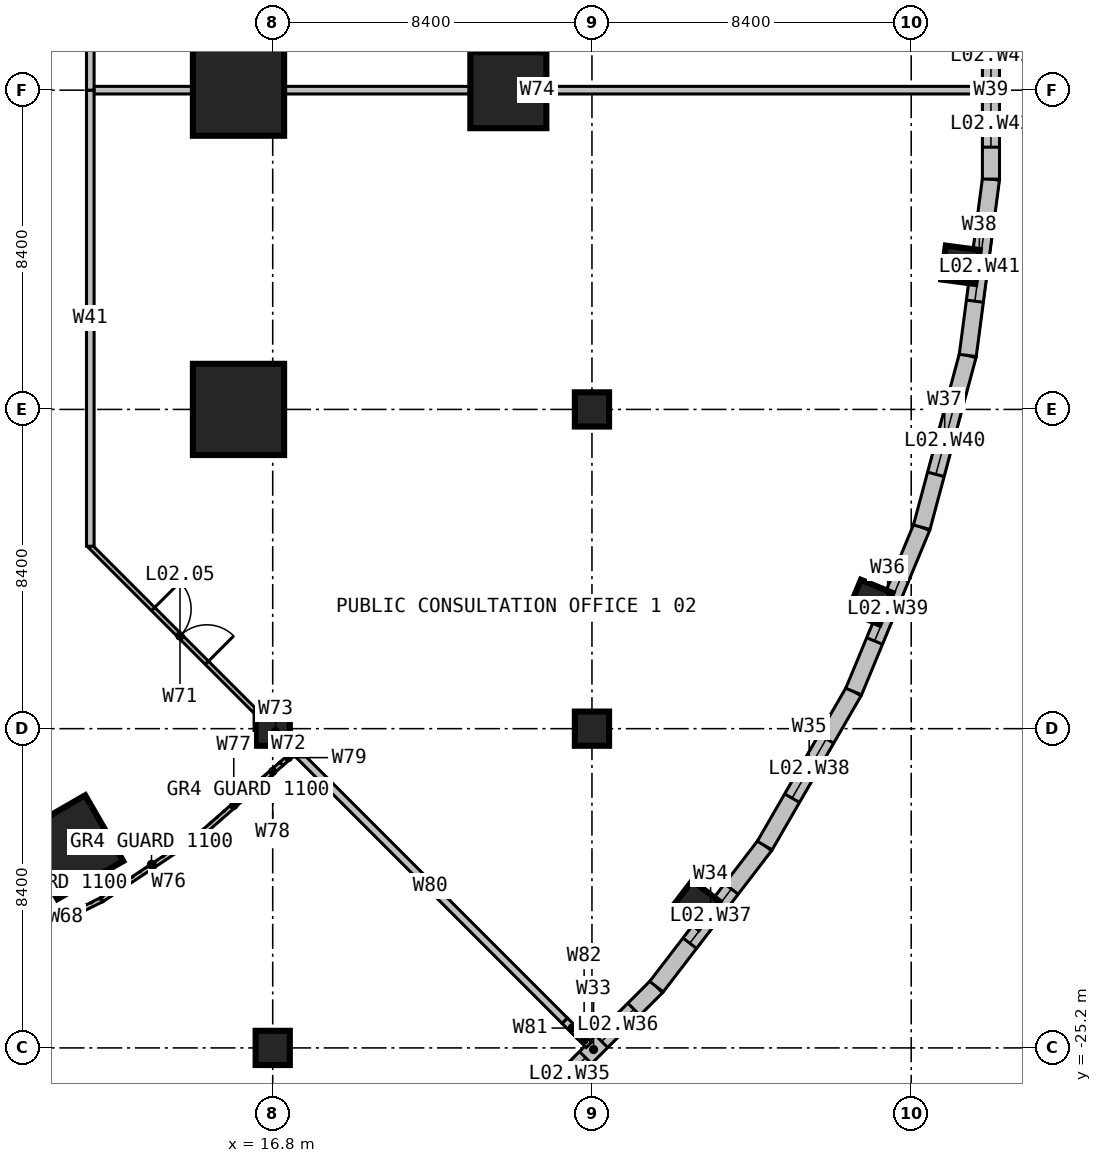
"""IFC4 building model, lengths in metres.
Left out: names, types, materials, properties, quantities, classifications, styles, units other than length and angle.
Written with IfcOpenShell. Run it as: python <this file> out.ifc"""

import sys

from ifc_helpers import new_model, si_unit, direction, frame, frame_2d, origin, origin_2d, place, context, subcontext, project, spatial, rectangle, hollow_rectangle, extrude, element, fill, save


model = new_model("IFC4")
c1 = context("Model", 3, precision=1e-05, world=origin(), true_north=direction((0.0, 1.0)))
c2 = subcontext(c1, "Body", "Model", "MODEL_VIEW")
j1 = project(units=[si_unit("LENGTHUNIT", "METRE"), si_unit("PLANEANGLEUNIT", "RADIAN")], contexts=[c1])
p1 = place(None, origin())
s1 = spatial("IfcSite", under=j1, at=p1, CompositionType="ELEMENT")
p2 = place(p1, origin())
s2 = spatial("IfcBuilding", under=s1, at=p2, CompositionType="ELEMENT")
p3 = place(p2, frame((0.0, 0.0, 11.0)))
s3 = spatial("IfcBuildingStorey", under=s2, at=p3, CompositionType="ELEMENT", Elevation=11.0)
for number, where, z_axis, x_axis in (
    (1, (16.8, -25.2, 0.0), (0.0, 0.0, 1.0), (1.0, 0.0, 0.0)),
    (2, (16.8, -16.8, 0.0), (0.0, 0.0, 1.0), (1.0, 0.0, 0.0)),
):
    element("IfcColumn", number, at=place(p3, frame(where, z_axis=z_axis, x_axis=x_axis)), inside=s3, PredefinedType="COLUMN", context=c2, shape_type="SweptSolid", body=[
        extrude(rectangle(XDim=0.9, YDim=0.9, at=origin_2d()), origin(), (0.0, 0.0, 1.0), 5.0),
    ])
for number, where, z_axis, x_axis in (
    (3, (15.9, -8.4, 0.0), (0.0, 0.0, 1.0), (1.0, 0.0, 0.0)),
    (4, (15.9, 0.0, 0.0), (0.0, 0.0, 1.0), (1.0, 0.0, 0.0)),
):
    element("IfcColumn", number, at=place(p3, frame(where, z_axis=z_axis, x_axis=x_axis)), inside=s3, PredefinedType="COLUMN", context=c2, shape_type="SweptSolid", body=[
        extrude(rectangle(XDim=2.4, YDim=2.4, at=origin_2d()), origin(), (0.0, 0.0, 1.0), 5.0),
    ])
for number, where, z_axis, x_axis in (
    (5, (25.2, -16.8, 0.0), (0.0, 0.0, 1.0), (1.0, 0.0, 0.0)),
    (6, (25.2, -8.4, 0.0), (0.0, 0.0, 1.0), (1.0, 0.0, 0.0)),
    (7, (27.926, -21.428, 0.0), (0.0, 0.0, 1.0), (0.793, -0.609, 0.0)),
    (8, (32.521, -13.47, 0.0), (0.0, 0.0, 1.0), (0.924, -0.383, 0.0)),
    (9, (34.899, -4.594, 0.0), (0.0, 0.0, 1.0), (0.991, -0.131, 0.0)),
):
    element("IfcColumn", number, at=place(p3, frame(where, z_axis=z_axis, x_axis=x_axis)), inside=s3, PredefinedType="COLUMN", context=c2, shape_type="SweptSolid", body=[
        extrude(rectangle(XDim=0.9, YDim=0.9, at=origin_2d()), origin(), (0.0, 0.0, 1.0), 5.0),
    ])
for number, where, z_axis, x_axis in (
    (10, (23.0, 0.0, 0.0), (0.0, 0.0, 1.0), (1.0, 0.0, 0.0)),
    (11, (11.5, -19.919, 0.0), (0.0, 0.0, 1.0), (0.5, -0.866, 0.0)),
):
    element("IfcColumn", number, at=place(p3, frame(where, z_axis=z_axis, x_axis=x_axis)), inside=s3, PredefinedType="COLUMN", context=c2, shape_type="SweptSolid", body=[
        extrude(hollow_rectangle(XDim=2.0, YDim=2.0, WallThickness=0.24, at=origin_2d()), origin(), (0.0, 0.0, 1.0), 5.0),
    ])
p4 = place(p3, frame((23.588, -26.897, 0.0), z_axis=(0.0, 0.0, 1.0), x_axis=(0.707106781187, 0.707106781187, 0.0)))
e12 = element("IfcWall", 12, at=p4, inside=s3, PredefinedType="SOLIDWALL", context=c2, shape_type="SweptSolid", body=[
    extrude(rectangle(XDim=4.679, YDim=0.45, at=frame_2d((2.34, 0.0))), origin(), (0.0, 0.0, 1.0), 4.7),
])
p5 = place(p4, frame((0.84, 0.0, 0.9)))
e13 = element("IfcOpeningElement", 13, at=p5, cuts=e12, PredefinedType="OPENING", context=c2, shape_type="SweptSolid", body=[
    extrude(rectangle(XDim=1.2, YDim=2.4, at=frame_2d((0.6, 1.2))), frame((0.0, 0.235, 0.0), z_axis=(0.0, -1.0, 0.0), x_axis=(1.0, 0.0, 0.0)), (0.0, 0.0, 1.0), 0.47),
])
p6 = place(p4, frame((2.64, 0.0, 0.9)))
e14 = element("IfcOpeningElement", 14, at=p6, cuts=e12, PredefinedType="OPENING", context=c2, shape_type="SweptSolid", body=[
    extrude(rectangle(XDim=1.2, YDim=2.4, at=frame_2d((0.6, 1.2))), frame((0.0, 0.235, 0.0), z_axis=(0.0, -1.0, 0.0), x_axis=(1.0, 0.0, 0.0)), (0.0, 0.0, 1.0), 0.47),
])
p7 = place(p3, frame((26.897, -23.588, 0.0), z_axis=(0.0, 0.0, 1.0), x_axis=(0.608769916927, 0.79334682721, 0.0)))
e15 = element("IfcWall", 15, at=p7, inside=s3, PredefinedType="SOLIDWALL", context=c2, shape_type="SweptSolid", body=[
    extrude(rectangle(XDim=4.68, YDim=0.45, at=frame_2d((2.34, 0.0))), origin(), (0.0, 0.0, 1.0), 4.7),
])
p8 = place(p7, frame((1.44, 0.0, 0.9)))
e16 = element("IfcOpeningElement", 16, at=p8, cuts=e15, PredefinedType="OPENING", context=c2, shape_type="SweptSolid", body=[
    extrude(rectangle(XDim=1.8, YDim=2.4, at=frame_2d((0.9, 1.2))), frame((0.0, 0.235, 0.0), z_axis=(0.0, -1.0, 0.0), x_axis=(1.0, 0.0, 0.0)), (0.0, 0.0, 1.0), 0.47),
])
p9 = place(p3, frame((29.746, -19.875, 0.0), z_axis=(0.0, 0.0, 1.0), x_axis=(0.500022025083, 0.866012687223, 0.0)))
e17 = element("IfcWall", 17, at=p9, inside=s3, PredefinedType="SOLIDWALL", context=c2, shape_type="SweptSolid", body=[
    extrude(rectangle(XDim=4.679, YDim=0.45, at=frame_2d((2.34, 0.0))), origin(), (0.0, 0.0, 1.0), 4.7),
])
p10 = place(p9, frame((1.44, 0.0, 0.9)))
e18 = element("IfcOpeningElement", 18, at=p10, cuts=e17, PredefinedType="OPENING", context=c2, shape_type="SweptSolid", body=[
    extrude(rectangle(XDim=1.8, YDim=2.4, at=frame_2d((0.9, 1.2))), frame((0.0, 0.235, 0.0), z_axis=(0.0, -1.0, 0.0), x_axis=(1.0, 0.0, 0.0)), (0.0, 0.0, 1.0), 0.47),
])
p11 = place(p3, frame((32.086, -15.823, 0.0), z_axis=(0.0, 0.0, 1.0), x_axis=(0.382669718086, 0.923885213032, 0.0)))
e19 = element("IfcWall", 19, at=p11, inside=s3, PredefinedType="SOLIDWALL", context=c2, shape_type="SweptSolid", body=[
    extrude(rectangle(XDim=4.68, YDim=0.45, at=frame_2d((2.34, 0.0))), origin(), (0.0, 0.0, 1.0), 4.7),
])
p12 = place(p11, frame((1.44, 0.0, 0.9)))
e20 = element("IfcOpeningElement", 20, at=p12, cuts=e19, PredefinedType="OPENING", context=c2, shape_type="SweptSolid", body=[
    extrude(rectangle(XDim=1.8, YDim=2.4, at=frame_2d((0.9, 1.2))), frame((0.0, 0.235, 0.0), z_axis=(0.0, -1.0, 0.0), x_axis=(1.0, 0.0, 0.0)), (0.0, 0.0, 1.0), 0.47),
])
p13 = place(p3, frame((33.876, -11.5, 0.0), z_axis=(0.0, 0.0, 1.0), x_axis=(0.258815185258, 0.965926860523, 0.0)))
e21 = element("IfcWall", 21, at=p13, inside=s3, PredefinedType="SOLIDWALL", context=c2, shape_type="SweptSolid", body=[
    extrude(rectangle(XDim=4.68, YDim=0.45, at=frame_2d((2.34, 0.0))), origin(), (0.0, 0.0, 1.0), 4.7),
])
p14 = place(p13, frame((1.44, 0.0, 0.9)))
e22 = element("IfcOpeningElement", 22, at=p14, cuts=e21, PredefinedType="OPENING", context=c2, shape_type="SweptSolid", body=[
    extrude(rectangle(XDim=1.8, YDim=2.4, at=frame_2d((0.9, 1.2))), frame((0.0, 0.235, 0.0), z_axis=(0.0, -1.0, 0.0), x_axis=(1.0, 0.0, 0.0)), (0.0, 0.0, 1.0), 0.47),
])
p15 = place(p3, frame((35.088, -6.979, 0.0), z_axis=(0.0, 0.0, 1.0), x_axis=(0.130536838198, 0.991443459746, 0.0)))
e23 = element("IfcWall", 23, at=p15, inside=s3, PredefinedType="SOLIDWALL", context=c2, shape_type="SweptSolid", body=[
    extrude(rectangle(XDim=4.679, YDim=0.45, at=frame_2d((2.34, 0.0))), origin(), (0.0, 0.0, 1.0), 4.7),
])
p16 = place(p15, frame((1.44, 0.0, 0.9)))
e24 = element("IfcOpeningElement", 24, at=p16, cuts=e23, PredefinedType="OPENING", context=c2, shape_type="SweptSolid", body=[
    extrude(rectangle(XDim=1.8, YDim=2.4, at=frame_2d((0.9, 1.2))), frame((0.0, 0.235, 0.0), z_axis=(0.0, -1.0, 0.0), x_axis=(1.0, 0.0, 0.0)), (0.0, 0.0, 1.0), 0.47),
])
p17 = place(p3, frame((35.698, -2.34, 0.0), z_axis=(0.0, 0.0, 1.0), x_axis=(0.0, 1.0, 0.0)))
e25 = element("IfcWall", 25, at=p17, inside=s3, PredefinedType="SOLIDWALL", context=c2, shape_type="SweptSolid", body=[
    extrude(rectangle(XDim=4.68, YDim=0.45, at=frame_2d((2.34, 0.0))), origin(), (0.0, 0.0, 1.0), 4.7),
])
p18 = place(p17, frame((0.84, 0.0, 0.9)))
e26 = element("IfcOpeningElement", 26, at=p18, cuts=e25, PredefinedType="OPENING", context=c2, shape_type="SweptSolid", body=[
    extrude(rectangle(XDim=1.2, YDim=2.4, at=frame_2d((0.6, 1.2))), frame((0.0, 0.235, 0.0), z_axis=(0.0, -1.0, 0.0), x_axis=(1.0, 0.0, 0.0)), (0.0, 0.0, 1.0), 0.47),
])
p19 = place(p17, frame((2.64, 0.0, 0.9)))
e27 = element("IfcOpeningElement", 27, at=p19, cuts=e25, PredefinedType="OPENING", context=c2, shape_type="SweptSolid", body=[
    extrude(rectangle(XDim=1.2, YDim=2.4, at=frame_2d((0.6, 1.2))), frame((0.0, 0.235, 0.0), z_axis=(0.0, -1.0, 0.0), x_axis=(1.0, 0.0, 0.0)), (0.0, 0.0, 1.0), 0.47),
])
p20 = place(p3, frame((10.408, -22.233, 0.0), z_axis=(0.0, 0.0, 1.0), x_axis=(0.896913641042, 0.442205744551, 0.0)))
e28 = element("IfcWall", 28, at=p20, inside=s3, PredefinedType="PARTITIONING", context=c2, shape_type="SweptSolid", body=[
    extrude(rectangle(XDim=2.109, YDim=0.12, at=frame_2d((1.055, 0.0))), origin(), (0.0, 0.0, 1.0), 4.7),
])
p21 = place(p3, frame((12.0, -12.0, 0.0), z_axis=(0.0, 0.0, 1.0), x_axis=(0.707106781187, -0.707106781187, 0.0)))
e29 = element("IfcWall", 29, at=p21, inside=s3, PredefinedType="PARTITIONING", context=c2, shape_type="SweptSolid", body=[
    extrude(rectangle(XDim=6.675, YDim=0.12, at=frame_2d((3.337, 0.0))), origin(), (0.0, 0.0, 1.0), 4.7),
])
p22 = place(p21, frame((2.338, 0.0, 0.0)))
e30 = element("IfcOpeningElement", 30, at=p22, cuts=e29, PredefinedType="OPENING", context=c2, shape_type="SweptSolid", body=[
    extrude(rectangle(XDim=2.0, YDim=2.4, at=frame_2d((1.0, 1.2))), frame((0.0, 0.07, 0.0), z_axis=(0.0, -1.0, 0.0), x_axis=(1.0, 0.0, 0.0)), (0.0, 0.0, 1.0), 0.14),
])
p23 = place(p3, frame((17.03, -17.03, 0.0), z_axis=(0.0, 0.0, 1.0), x_axis=(0.707106781187, -0.707106781187, 0.0)))
e31 = element("IfcWall", 31, at=p23, inside=s3, PredefinedType="PARTITIONING", context=c2, shape_type="SweptSolid", body=[
    extrude(rectangle(XDim=0.523, YDim=0.12, at=frame_2d((0.262, 0.0))), origin(), (0.0, 0.0, 1.0), 4.7),
])
p24 = place(p3, frame((16.72, -16.72, 0.0), z_axis=(0.0, 0.0, 1.0), x_axis=(0.707106781187, -0.707106781187, 0.0)))
e32 = element("IfcWall", 32, at=p24, inside=s3, PredefinedType="PARTITIONING", context=c2, shape_type="SweptSolid", body=[
    extrude(rectangle(XDim=0.438, YDim=0.12, at=frame_2d((0.219, 0.0))), origin(), (0.0, 0.0, 1.0), 4.3),
])
p25 = place(p3, frame((12.0, 0.0, 0.0), z_axis=(0.0, 0.0, 1.0), x_axis=(1.0, 0.0, 0.0)))
e33 = element("IfcWall", 33, at=p25, inside=s3, PredefinedType="PARTITIONING", context=c2, shape_type="SweptSolid", body=[
    extrude(rectangle(XDim=23.52, YDim=0.2, at=frame_2d((11.76, 0.0))), origin(), (0.0, 0.0, 1.0), 4.7),
])
p26 = place(p3, frame((12.3, -21.3, 0.0), z_axis=(0.0, 0.0, 1.0), x_axis=(0.832994734858, 0.553280915719, 0.0)))
e34 = element("IfcWall", 34, at=p26, inside=s3, PredefinedType="PARTITIONING", context=c2, shape_type="SweptSolid", body=[
    extrude(rectangle(XDim=3.217, YDim=0.12, at=frame_2d((1.609, 0.0))), origin(), (0.0, 0.0, 1.0), 4.7),
])
p27 = place(p3, frame((14.98, -19.52, 0.0), z_axis=(0.0, 0.0, 1.0), x_axis=(0.752226011438, 0.658905173538, 0.0)))
e35 = element("IfcWall", 35, at=p27, inside=s3, PredefinedType="PARTITIONING", context=c2, shape_type="SweptSolid", body=[
    extrude(rectangle(XDim=2.114, YDim=0.12, at=frame_2d((1.057, 0.0))), origin(), (0.0, 0.0, 1.0), 4.7),
])
p28 = place(p3, frame((16.57, -18.127, 0.0), z_axis=(0.0, 0.0, 1.0), x_axis=(0.752081905539, 0.65906965289, 0.0)))
e36 = element("IfcWall", 36, at=p28, inside=s3, PredefinedType="PARTITIONING", context=c2, shape_type="SweptSolid", body=[
    extrude(rectangle(XDim=0.612, YDim=0.12, at=frame_2d((0.306, 0.0))), origin(), (0.0, 0.0, 1.0), 4.3),
])
p29 = place(p3, frame((17.03, -17.724, 0.0), z_axis=(0.0, 0.0, 1.0), x_axis=(0.751992181934, 0.659172024824, 0.0)))
e37 = element("IfcWall", 37, at=p29, inside=s3, PredefinedType="PARTITIONING", context=c2, shape_type="SweptSolid", body=[
    extrude(rectangle(XDim=0.492, YDim=0.12, at=frame_2d((0.246, 0.0))), origin(), (0.0, 0.0, 1.0), 4.7),
])
p30 = place(p3, frame((17.4, -17.4, 0.0), z_axis=(0.0, 0.0, 1.0), x_axis=(0.707106781187, -0.707106781187, 0.0)))
e38 = element("IfcWall", 38, at=p30, inside=s3, PredefinedType="PARTITIONING", context=c2, shape_type="SweptSolid", body=[
    extrude(rectangle(XDim=10.022, YDim=0.2, at=frame_2d((5.011, 0.0))), origin(), (0.0, 0.0, 1.0), 4.7),
])
p31 = place(p3, frame((24.486, -24.486, 0.0), z_axis=(0.0, 0.0, 1.0), x_axis=(0.707106781187, -0.707106781187, 0.0)))
e39 = element("IfcWall", 39, at=p31, inside=s3, PredefinedType="PARTITIONING", context=c2, shape_type="SweptSolid", body=[
    extrude(rectangle(XDim=0.54, YDim=0.2, at=frame_2d((0.27, 0.0))), origin(), (0.0, 0.0, 1.0), 4.3),
])
p32 = place(p3, frame((24.868, -24.868, 0.0), z_axis=(0.0, 0.0, 1.0), x_axis=(0.707106781187, -0.707106781187, 0.0)))
e40 = element("IfcWall", 40, at=p32, inside=s3, PredefinedType="PARTITIONING", context=c2, shape_type="SweptSolid", body=[
    extrude(rectangle(XDim=0.356, YDim=0.2, at=frame_2d((0.178, 0.0))), origin(), (0.0, 0.0, 1.0), 4.7),
])
p33 = place(p3, frame((12.0, -12.0, 0.0), z_axis=(0.0, 0.0, 1.0), x_axis=(0.0, 1.0, 0.0)))
e41 = element("IfcWall", 41, at=p33, inside=s3, PredefinedType="PARTITIONING", context=c2, shape_type="SweptSolid", body=[
    extrude(rectangle(XDim=12.0, YDim=0.2, at=frame_2d((6.0, 0.0))), origin(), (0.0, 0.0, 1.0), 4.7),
])
p34 = place(p3, frame((12.0, 0.0, 0.0), z_axis=(0.0, 0.0, 1.0), x_axis=(0.0, 1.0, 0.0)))
e42 = element("IfcWall", 42, at=p34, inside=s3, PredefinedType="PARTITIONING", context=c2, shape_type="SweptSolid", body=[
    extrude(rectangle(XDim=12.0, YDim=0.2, at=frame_2d((6.0, 0.0))), origin(), (0.0, 0.0, 1.0), 4.7),
])
p35 = place(p34, frame((5.0, 0.0, 0.0)))
e43 = element("IfcOpeningElement", 43, at=p35, cuts=e42, PredefinedType="OPENING", context=c2, shape_type="SweptSolid", body=[
    extrude(rectangle(XDim=2.0, YDim=2.4, at=frame_2d((1.0, 1.2))), frame((0.0, 0.11, 0.0), z_axis=(0.0, -1.0, 0.0), x_axis=(1.0, 0.0, 0.0)), (0.0, 0.0, 1.0), 0.22),
])
p36 = place(p5, origin())
e44 = element("IfcWindow", 44, at=p36, inside=s3, PartitioningType="SINGLE_PANEL", PredefinedType="WINDOW", context=c2, shape_type="SweptSolid", body=[
    extrude(rectangle(XDim=1.2, YDim=2.4, at=frame_2d((0.6, 1.2))), frame((0.0, 0.03, 0.0), z_axis=(0.0, -1.0, 0.0), x_axis=(1.0, 0.0, 0.0)), (0.0, 0.0, 1.0), 0.06),
])
fill(e13, e44)
p37 = place(p6, origin())
e45 = element("IfcWindow", 45, at=p37, inside=s3, PartitioningType="SINGLE_PANEL", PredefinedType="WINDOW", context=c2, shape_type="SweptSolid", body=[
    extrude(rectangle(XDim=1.2, YDim=2.4, at=frame_2d((0.6, 1.2))), frame((0.0, 0.03, 0.0), z_axis=(0.0, -1.0, 0.0), x_axis=(1.0, 0.0, 0.0)), (0.0, 0.0, 1.0), 0.06),
])
fill(e14, e45)
p38 = place(p8, origin())
e46 = element("IfcWindow", 46, at=p38, inside=s3, PartitioningType="SINGLE_PANEL", PredefinedType="WINDOW", context=c2, shape_type="SweptSolid", body=[
    extrude(rectangle(XDim=1.8, YDim=2.4, at=frame_2d((0.9, 1.2))), frame((0.0, 0.03, 0.0), z_axis=(0.0, -1.0, 0.0), x_axis=(1.0, 0.0, 0.0)), (0.0, 0.0, 1.0), 0.06),
])
fill(e16, e46)
p39 = place(p10, origin())
e47 = element("IfcWindow", 47, at=p39, inside=s3, PartitioningType="SINGLE_PANEL", PredefinedType="WINDOW", context=c2, shape_type="SweptSolid", body=[
    extrude(rectangle(XDim=1.8, YDim=2.4, at=frame_2d((0.9, 1.2))), frame((0.0, 0.03, 0.0), z_axis=(0.0, -1.0, 0.0), x_axis=(1.0, 0.0, 0.0)), (0.0, 0.0, 1.0), 0.06),
])
fill(e18, e47)
p40 = place(p12, origin())
e48 = element("IfcWindow", 48, at=p40, inside=s3, PartitioningType="SINGLE_PANEL", PredefinedType="WINDOW", context=c2, shape_type="SweptSolid", body=[
    extrude(rectangle(XDim=1.8, YDim=2.4, at=frame_2d((0.9, 1.2))), frame((0.0, 0.03, 0.0), z_axis=(0.0, -1.0, 0.0), x_axis=(1.0, 0.0, 0.0)), (0.0, 0.0, 1.0), 0.06),
])
fill(e20, e48)
p41 = place(p14, origin())
e49 = element("IfcWindow", 49, at=p41, inside=s3, PartitioningType="SINGLE_PANEL", PredefinedType="WINDOW", context=c2, shape_type="SweptSolid", body=[
    extrude(rectangle(XDim=1.8, YDim=2.4, at=frame_2d((0.9, 1.2))), frame((0.0, 0.03, 0.0), z_axis=(0.0, -1.0, 0.0), x_axis=(1.0, 0.0, 0.0)), (0.0, 0.0, 1.0), 0.06),
])
fill(e22, e49)
p42 = place(p16, origin())
e50 = element("IfcWindow", 50, at=p42, inside=s3, PartitioningType="SINGLE_PANEL", PredefinedType="WINDOW", context=c2, shape_type="SweptSolid", body=[
    extrude(rectangle(XDim=1.8, YDim=2.4, at=frame_2d((0.9, 1.2))), frame((0.0, 0.03, 0.0), z_axis=(0.0, -1.0, 0.0), x_axis=(1.0, 0.0, 0.0)), (0.0, 0.0, 1.0), 0.06),
])
fill(e24, e50)
p43 = place(p18, origin())
e51 = element("IfcWindow", 51, at=p43, inside=s3, PartitioningType="SINGLE_PANEL", PredefinedType="WINDOW", context=c2, shape_type="SweptSolid", body=[
    extrude(rectangle(XDim=1.2, YDim=2.4, at=frame_2d((0.6, 1.2))), frame((0.0, 0.03, 0.0), z_axis=(0.0, -1.0, 0.0), x_axis=(1.0, 0.0, 0.0)), (0.0, 0.0, 1.0), 0.06),
])
fill(e26, e51)
p44 = place(p19, origin())
e52 = element("IfcWindow", 52, at=p44, inside=s3, PartitioningType="SINGLE_PANEL", PredefinedType="WINDOW", context=c2, shape_type="SweptSolid", body=[
    extrude(rectangle(XDim=1.2, YDim=2.4, at=frame_2d((0.6, 1.2))), frame((0.0, 0.03, 0.0), z_axis=(0.0, -1.0, 0.0), x_axis=(1.0, 0.0, 0.0)), (0.0, 0.0, 1.0), 0.06),
])
fill(e27, e52)
p45 = place(p22, origin())
e53 = element("IfcDoor", 53, at=p45, inside=s3, OperationType="DOUBLE_DOOR_SINGLE_SWING", PredefinedType="DOOR", context=c2, shape_type="SweptSolid", body=[
    extrude(rectangle(XDim=2.0, YDim=2.4, at=frame_2d((1.0, 1.2))), frame((0.0, 0.025, 0.0), z_axis=(0.0, -1.0, 0.0), x_axis=(1.0, 0.0, 0.0)), (0.0, 0.0, 1.0), 0.05),
])
fill(e30, e53)
save(model, sys.argv[1])
